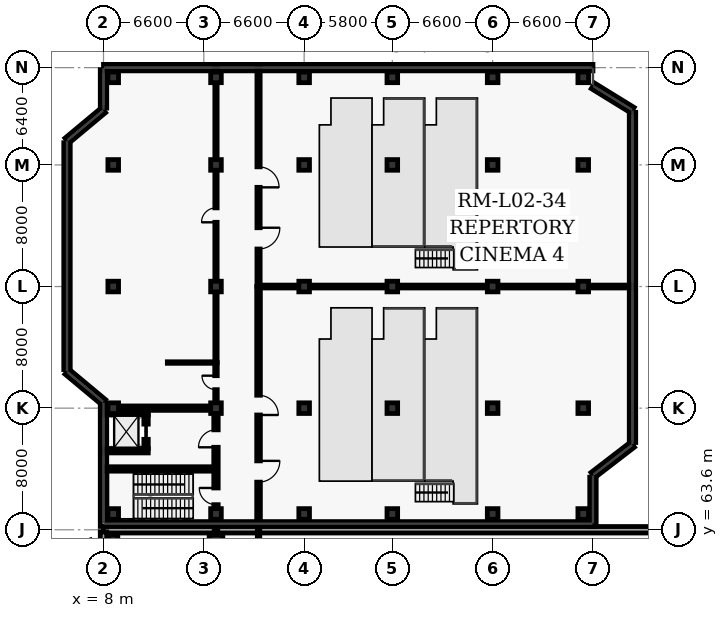
"""IFC4 building model, lengths in metres.
Left out: names, types, materials, properties, quantities, classifications, styles, units other than length and angle.
Written with IfcOpenShell. Run it as: python <this file> out.ifc"""

import sys

from ifc_helpers import new_model, si_unit, direction, frame, frame_2d, origin, origin_2d, place, context, subcontext, project, spatial, rectangle, extrude, element, fill, save


model = new_model("IFC4")
c1 = context("Model", 3, precision=1e-05, world=origin(), true_north=direction((0.0, 1.0)))
c2 = subcontext(c1, "Body", "Model", "MODEL_VIEW")
j1 = project(units=[si_unit("LENGTHUNIT", "METRE"), si_unit("PLANEANGLEUNIT", "RADIAN")], contexts=[c1])
p1 = place(None, origin())
s1 = spatial("IfcSite", under=j1, at=p1, CompositionType="ELEMENT")
p2 = place(p1, origin())
s2 = spatial("IfcBuilding", under=s1, at=p2, CompositionType="ELEMENT")
p3 = place(p2, frame((0.0, 0.0, 10.2)))
s3 = spatial("IfcBuildingStorey", under=s2, at=p3, CompositionType="ELEMENT", Elevation=10.2)
p4 = place(p3, frame((8.64, 62.96, 0.0), z_axis=(0.0, 0.0, 1.0), x_axis=(1.0, 0.0, 0.0)))
e1 = element("IfcColumn", 1, at=p4, inside=s3, PredefinedType="COLUMN", context=c2, shape_type="SweptSolid", body=[
    extrude(rectangle(XDim=0.6, YDim=0.6, at=origin_2d()), origin(), (0.0, 0.0, 1.0), 5.4),
])
p5 = place(p3, frame((15.4, 62.96, 0.0), z_axis=(0.0, 0.0, 1.0), x_axis=(1.0, 0.0, 0.0)))
e2 = element("IfcColumn", 2, at=p5, inside=s3, PredefinedType="COLUMN", context=c2, shape_type="SweptSolid", body=[
    extrude(rectangle(XDim=0.6, YDim=0.9, at=origin_2d()), origin(), (0.0, 0.0, 1.0), 5.4),
])
for number, where, z_axis, x_axis in (
    (3, (8.64, 64.64, 0.0), (0.0, 0.0, 1.0), (1.0, 0.0, 0.0)),
    (4, (8.64, 71.6, 0.0), (0.0, 0.0, 1.0), (1.0, 0.0, 0.0)),
    (5, (8.64, 79.6, 0.0), (0.0, 0.0, 1.0), (1.0, 0.0, 0.0)),
    (6, (8.64, 87.6, 0.0), (0.0, 0.0, 1.0), (1.0, 0.0, 0.0)),
    (7, (8.64, 93.36, 0.0), (0.0, 0.0, 1.0), (1.0, 0.0, 0.0)),
    (8, (15.4, 64.64, 0.0), (0.0, 0.0, 1.0), (1.0, 0.0, 0.0)),
    (9, (15.4, 71.6, 0.0), (0.0, 0.0, 1.0), (1.0, 0.0, 0.0)),
    (10, (15.4, 79.6, 0.0), (0.0, 0.0, 1.0), (1.0, 0.0, 0.0)),
    (11, (15.4, 87.6, 0.0), (0.0, 0.0, 1.0), (1.0, 0.0, 0.0)),
    (12, (15.4, 93.36, 0.0), (0.0, 0.0, 1.0), (1.0, 0.0, 0.0)),
    (13, (21.2, 64.64, 0.0), (0.0, 0.0, 1.0), (1.0, 0.0, 0.0)),
    (14, (21.2, 71.6, 0.0), (0.0, 0.0, 1.0), (1.0, 0.0, 0.0)),
    (15, (21.2, 79.6, 0.0), (0.0, 0.0, 1.0), (1.0, 0.0, 0.0)),
    (16, (21.2, 87.6, 0.0), (0.0, 0.0, 1.0), (1.0, 0.0, 0.0)),
    (17, (21.2, 93.36, 0.0), (0.0, 0.0, 1.0), (1.0, 0.0, 0.0)),
    (18, (27.0, 64.64, 0.0), (0.0, 0.0, 1.0), (1.0, 0.0, 0.0)),
    (19, (27.0, 71.6, 0.0), (0.0, 0.0, 1.0), (1.0, 0.0, 0.0)),
    (20, (27.0, 79.6, 0.0), (0.0, 0.0, 1.0), (1.0, 0.0, 0.0)),
    (21, (27.0, 87.6, 0.0), (0.0, 0.0, 1.0), (1.0, 0.0, 0.0)),
    (22, (27.0, 93.36, 0.0), (0.0, 0.0, 1.0), (1.0, 0.0, 0.0)),
    (23, (33.6, 64.64, 0.0), (0.0, 0.0, 1.0), (1.0, 0.0, 0.0)),
    (24, (33.6, 71.6, 0.0), (0.0, 0.0, 1.0), (1.0, 0.0, 0.0)),
    (25, (33.6, 79.6, 0.0), (0.0, 0.0, 1.0), (1.0, 0.0, 0.0)),
    (26, (33.6, 87.6, 0.0), (0.0, 0.0, 1.0), (1.0, 0.0, 0.0)),
    (27, (33.6, 93.36, 0.0), (0.0, 0.0, 1.0), (1.0, 0.0, 0.0)),
    (28, (39.56, 64.64, 0.0), (0.0, 0.0, 1.0), (1.0, 0.0, 0.0)),
    (29, (39.56, 71.6, 0.0), (0.0, 0.0, 1.0), (1.0, 0.0, 0.0)),
    (30, (39.56, 79.6, 0.0), (0.0, 0.0, 1.0), (1.0, 0.0, 0.0)),
    (31, (39.56, 87.6, 0.0), (0.0, 0.0, 1.0), (1.0, 0.0, 0.0)),
    (32, (39.56, 93.36, 0.0), (0.0, 0.0, 1.0), (1.0, 0.0, 0.0)),
):
    element("IfcColumn", number, at=place(p3, frame(where, z_axis=z_axis, x_axis=x_axis)), inside=s3, PredefinedType="COLUMN", context=c2, shape_type="SweptSolid", body=[
        extrude(rectangle(XDim=0.7, YDim=0.7, at=origin_2d()), origin(), (0.0, 0.0, 1.0), 5.4),
    ])
p6 = place(p3, frame((8.0, 63.6, 0.0), z_axis=(0.0, 0.0, 1.0), x_axis=(1.0, 0.0, 0.0)))
e33 = element("IfcWall", 33, at=p6, inside=s3, PredefinedType="SOLIDWALL", context=c2, shape_type="SweptSolid", body=[
    extrude(rectangle(XDim=38.0, YDim=0.425, at=frame_2d((19.0, 0.0))), origin(), (0.0, 0.0, 1.0), 5.16),
])
p7 = place(p3, frame((8.0, 7.74, 0.0), z_axis=(0.0, 0.0, 1.0), x_axis=(0.0, 1.0, 0.0)))
e34 = element("IfcWall", 34, at=p7, inside=s3, PredefinedType="SOLIDWALL", context=c2, shape_type="SweptSolid", body=[
    extrude(rectangle(XDim=55.72, YDim=0.425, at=frame_2d((27.86, 0.0))), origin(), (0.0, 0.0, 1.0), 5.16),
])
p8 = place(p3, frame((8.0, 72.0, 0.0), z_axis=(0.0, 0.0, 1.0), x_axis=(-0.768208468069, 0.640199773186, 0.0)))
e35 = element("IfcWall", 35, at=p8, inside=s3, PredefinedType="SOLIDWALL", context=c2, shape_type="SweptSolid", body=[
    extrude(rectangle(XDim=3.124, YDim=0.425, at=frame_2d((1.562, 0.0))), origin(), (0.0, 0.0, 1.0), 5.1),
])
p9 = place(p3, frame((5.6, 74.14, 0.0), z_axis=(0.0, 0.0, 1.0), x_axis=(0.0, 1.0, 0.0)))
e36 = element("IfcWall", 36, at=p9, inside=s3, PredefinedType="SOLIDWALL", context=c2, shape_type="SweptSolid", body=[
    extrude(rectangle(XDim=14.92, YDim=0.425, at=frame_2d((7.46, 0.0))), origin(), (0.0, 0.0, 1.0), 5.1),
])
p10 = place(p3, frame((5.6, 89.2, 0.0), z_axis=(0.0, 0.0, 1.0), x_axis=(0.768208468069, 0.640199773186, 0.0)))
e37 = element("IfcWall", 37, at=p10, inside=s3, PredefinedType="SOLIDWALL", context=c2, shape_type="SweptSolid", body=[
    extrude(rectangle(XDim=3.124, YDim=0.425, at=frame_2d((1.562, 0.0))), origin(), (0.0, 0.0, 1.0), 5.1),
])
p11 = place(p3, frame((8.0, 91.34, 0.0), z_axis=(0.0, 0.0, 1.0), x_axis=(0.0, 1.0, 0.0)))
e38 = element("IfcWall", 38, at=p11, inside=s3, PredefinedType="SOLIDWALL", context=c2, shape_type="SweptSolid", body=[
    extrude(rectangle(XDim=2.52, YDim=0.425, at=frame_2d((1.26, 0.0))), origin(), (0.0, 0.0, 1.0), 5.1),
])
p12 = place(p3, frame((8.0, 94.0, 0.0), z_axis=(0.0, 0.0, 1.0), x_axis=(1.0, 0.0, 0.0)))
e39 = element("IfcWall", 39, at=p12, inside=s3, PredefinedType="SOLIDWALL", context=c2, shape_type="SweptSolid", body=[
    extrude(rectangle(XDim=32.2, YDim=0.425, at=frame_2d((16.1, 0.0))), origin(), (0.0, 0.0, 1.0), 3.7),
])
p13 = place(p3, frame((40.2, 92.8, 0.0), z_axis=(0.0, 0.0, 1.0), x_axis=(0.851652825334, -0.524106349037, 0.0)))
e40 = element("IfcWall", 40, at=p13, inside=s3, PredefinedType="SOLIDWALL", context=c2, shape_type="SweptSolid", body=[
    extrude(rectangle(XDim=3.053, YDim=0.425, at=frame_2d((1.526, 0.0))), origin(), (0.0, 0.0, 1.0), 5.1),
])
p14 = place(p3, frame((42.8, 91.06, 0.0), z_axis=(0.0, 0.0, 1.0), x_axis=(0.0, -1.0, 0.0)))
e41 = element("IfcWall", 41, at=p14, inside=s3, PredefinedType="SOLIDWALL", context=c2, shape_type="SweptSolid", body=[
    extrude(rectangle(XDim=21.72, YDim=0.425, at=frame_2d((10.86, 0.0))), origin(), (0.0, 0.0, 1.0), 5.1),
])
p15 = place(p3, frame((42.8, 69.2, 0.0), z_axis=(0.0, 0.0, 1.0), x_axis=(-0.792635056011, -0.609696373601, 0.0)))
e42 = element("IfcWall", 42, at=p15, inside=s3, PredefinedType="SOLIDWALL", context=c2, shape_type="SweptSolid", body=[
    extrude(rectangle(XDim=3.28, YDim=0.425, at=frame_2d((1.64, 0.0))), origin(), (0.0, 0.0, 1.0), 5.1),
])
p16 = place(p3, frame((40.2, 67.06, 0.0), z_axis=(0.0, 0.0, 1.0), x_axis=(0.0, -1.0, 0.0)))
e43 = element("IfcWall", 43, at=p16, inside=s3, PredefinedType="SOLIDWALL", context=c2, shape_type="SweptSolid", body=[
    extrude(rectangle(XDim=3.242, YDim=0.425, at=frame_2d((1.621, 0.0))), origin(), (0.0, 0.0, 1.0), 5.1),
])
p17 = place(p3, frame((40.2, 64.0, 0.0), z_axis=(0.0, 0.0, 1.0), x_axis=(-1.0, 0.0, 0.0)))
e44 = element("IfcWall", 44, at=p17, inside=s3, PredefinedType="SOLIDWALL", context=c2, shape_type="SweptSolid", body=[
    extrude(rectangle(XDim=32.2, YDim=0.275, at=frame_2d((16.1, 0.0))), origin(), (0.0, 0.0, 1.0), 3.7),
])
p18 = place(p3, frame((8.0, 63.818, 0.0), z_axis=(0.0, 0.0, 1.0), x_axis=(0.0, 1.0, 0.0)))
e45 = element("IfcWall", 45, at=p18, inside=s3, PredefinedType="SOLIDWALL", context=c2, shape_type="SweptSolid", body=[
    extrude(rectangle(XDim=8.042, YDim=0.425, at=frame_2d((4.021, 0.0))), origin(), (0.0, 0.0, 1.0), 5.1),
])
p19 = place(p3, frame((7.855, 71.6, 0.0), z_axis=(0.0, 0.0, 1.0), x_axis=(1.0, 0.0, 0.0)))
e46 = element("IfcWall", 46, at=p19, inside=s3, PredefinedType="SHEAR", context=c2, shape_type="SweptSolid", body=[
    extrude(rectangle(XDim=7.193, YDim=0.29, at=frame_2d((3.597, 0.0))), origin(), (0.0, 0.0, 1.0), 5.1),
])
p20 = place(p3, frame((15.4, 64.145, 0.0), z_axis=(0.0, 0.0, 1.0), x_axis=(0.0, 1.0, 0.0)))
e47 = element("IfcWall", 47, at=p20, inside=s3, PredefinedType="SHEAR", context=c2, shape_type="SweptSolid", body=[
    extrude(rectangle(XDim=7.103, YDim=0.29, at=frame_2d((3.552, 0.0))), origin(), (0.0, 0.0, 1.0), 5.1),
])
p21 = place(p20, frame((1.105, 0.0, 0.0)))
e48 = element("IfcOpeningElement", 48, at=p21, cuts=e47, PredefinedType="OPENING", context=c2, shape_type="SweptSolid", body=[
    extrude(rectangle(XDim=1.1, YDim=2.15, at=frame_2d((0.55, 1.075))), frame((0.0, 0.155, 0.0), z_axis=(0.0, -1.0, 0.0), x_axis=(1.0, 0.0, 0.0)), (0.0, 0.0, 1.0), 0.31),
])
p22 = place(p20, frame((4.88, 0.0, 0.0)))
e49 = element("IfcOpeningElement", 49, at=p22, cuts=e47, PredefinedType="OPENING", context=c2, shape_type="SweptSolid", body=[
    extrude(rectangle(XDim=1.15, YDim=2.2, at=frame_2d((0.575, 1.1))), frame((0.0, 0.155, 0.0), z_axis=(0.0, -1.0, 0.0), x_axis=(1.0, 0.0, 0.0)), (0.0, 0.0, 1.0), 0.31),
])
p23 = place(p3, frame((8.145, 67.6, 0.0), z_axis=(0.0, 0.0, 1.0), x_axis=(1.0, 0.0, 0.0)))
e50 = element("IfcWall", 50, at=p23, inside=s3, PredefinedType="SHEAR", context=c2, shape_type="SweptSolid", body=[
    extrude(rectangle(XDim=7.11, YDim=0.29, at=frame_2d((3.555, 0.0))), origin(), (0.0, 0.0, 1.0), 5.1),
])
for number, where, z_axis, x_axis in (
    (51, (8.055, 68.8, 0.0), (0.0, 0.0, 1.0), (1.0, 0.0, 0.0)),
    (52, (8.055, 71.3, 0.0), (0.0, 0.0, 1.0), (1.0, 0.0, 0.0)),
):
    element("IfcWall", number, at=place(p3, frame(where, z_axis=z_axis, x_axis=x_axis)), inside=s3, PredefinedType="SHEAR", context=c2, shape_type="SweptSolid", body=[
        extrude(rectangle(XDim=2.89, YDim=0.29, at=frame_2d((1.445, 0.0))), origin(), (0.0, 0.0, 1.0), 5.1),
    ])
p24 = place(p3, frame((10.8, 68.945, 0.0), z_axis=(0.0, 0.0, 1.0), x_axis=(0.0, 1.0, 0.0)))
e53 = element("IfcWall", 53, at=p24, inside=s3, PredefinedType="SHEAR", context=c2, shape_type="SweptSolid", body=[
    extrude(rectangle(XDim=2.21, YDim=0.29, at=frame_2d((1.105, 0.0))), origin(), (0.0, 0.0, 1.0), 5.1),
])
p25 = place(p24, frame((0.605, 0.0, 0.0)))
e54 = element("IfcOpeningElement", 54, at=p25, cuts=e53, PredefinedType="OPENING", context=c2, shape_type="SweptSolid", body=[
    extrude(rectangle(XDim=1.0, YDim=2.15, at=frame_2d((0.5, 1.075))), frame((0.0, 0.155, 0.0), z_axis=(0.0, -1.0, 0.0), x_axis=(1.0, 0.0, 0.0)), (0.0, 0.0, 1.0), 0.31),
])
p26 = place(p3, frame((15.4, 44.0, 0.0), z_axis=(0.0, 0.0, 1.0), x_axis=(0.0, 1.0, 0.0)))
e55 = element("IfcWall", 55, at=p26, inside=s3, PredefinedType="PARTITIONING", context=c2, shape_type="SweptSolid", body=[
    extrude(rectangle(XDim=19.6, YDim=0.24, at=frame_2d((9.8, 0.0))), origin(), (0.0, 0.0, 1.0), 4.31),
])
p27 = place(p26, frame((9.3, 0.0, 0.0)))
e56 = element("IfcOpeningElement", 56, at=p27, cuts=e55, PredefinedType="OPENING", context=c2, shape_type="SweptSolid", body=[
    extrude(rectangle(XDim=1.0, YDim=2.1, at=frame_2d((0.5, 1.05))), frame((0.0, 0.13, 0.0), z_axis=(0.0, -1.0, 0.0), x_axis=(1.0, 0.0, 0.0)), (0.0, 0.0, 1.0), 0.26),
])
p28 = place(p3, frame((18.2, 63.6, 0.0), z_axis=(0.0, 0.0, 1.0), x_axis=(0.0, -1.0, 0.0)))
e57 = element("IfcWall", 57, at=p28, inside=s3, PredefinedType="PARTITIONING", context=c2, shape_type="SweptSolid", body=[
    extrude(rectangle(XDim=16.0, YDim=0.165, at=frame_2d((8.0, 0.0))), origin(), (0.0, 0.0, 1.0), 5.16),
])
p29 = place(p28, frame((7.41, 0.0, 0.0)))
e58 = element("IfcOpeningElement", 58, at=p29, cuts=e57, PredefinedType="OPENING", context=c2, shape_type="SweptSolid", body=[
    extrude(rectangle(XDim=1.18, YDim=2.15, at=frame_2d((0.59, 1.075))), frame((0.0, 0.093, 0.0), z_axis=(0.0, -1.0, 0.0), x_axis=(1.0, 0.0, 0.0)), (0.0, 0.0, 1.0), 0.185),
])
p30 = place(p28, frame((11.89, 0.0, 0.0)))
e59 = element("IfcOpeningElement", 59, at=p30, cuts=e57, PredefinedType="OPENING", context=c2, shape_type="SweptSolid", body=[
    extrude(rectangle(XDim=1.18, YDim=2.15, at=frame_2d((0.59, 1.075))), frame((0.0, 0.093, 0.0), z_axis=(0.0, -1.0, 0.0), x_axis=(1.0, 0.0, 0.0)), (0.0, 0.0, 1.0), 0.185),
])
p31 = place(p3, frame((15.4, 71.952, 0.0), z_axis=(0.0, 0.0, 1.0), x_axis=(0.0, 1.0, 0.0)))
e60 = element("IfcWall", 60, at=p31, inside=s3, PredefinedType="PARTITIONING", context=c2, shape_type="SweptSolid", body=[
    extrude(rectangle(XDim=2.648, YDim=0.165, at=frame_2d((1.324, 0.0))), origin(), (0.0, 0.0, 1.0), 4.25),
])
p32 = place(p31, frame((0.864, 0.0, 0.0)))
e61 = element("IfcOpeningElement", 61, at=p32, cuts=e60, PredefinedType="OPENING", context=c2, shape_type="SweptSolid", body=[
    extrude(rectangle(XDim=0.92, YDim=2.1, at=frame_2d((0.46, 1.05))), frame((0.0, 0.093, 0.0), z_axis=(0.0, -1.0, 0.0), x_axis=(1.0, 0.0, 0.0)), (0.0, 0.0, 1.0), 0.185),
])
p33 = place(p3, frame((15.4, 74.6, 0.0), z_axis=(0.0, 0.0, 1.0), x_axis=(0.0, 1.0, 0.0)))
e62 = element("IfcWall", 62, at=p33, inside=s3, PredefinedType="PARTITIONING", context=c2, shape_type="SweptSolid", body=[
    extrude(rectangle(XDim=19.4, YDim=0.15, at=frame_2d((9.7, 0.0))), origin(), (0.0, 0.0, 1.0), 4.25),
])
p34 = place(p33, frame((9.225, 0.0, 0.0)))
e63 = element("IfcOpeningElement", 63, at=p34, cuts=e62, PredefinedType="OPENING", context=c2, shape_type="SweptSolid", body=[
    extrude(rectangle(XDim=0.95, YDim=2.1, at=frame_2d((0.475, 1.05))), frame((0.0, 0.085, 0.0), z_axis=(0.0, -1.0, 0.0), x_axis=(1.0, 0.0, 0.0)), (0.0, 0.0, 1.0), 0.17),
])
p35 = place(p3, frame((18.2, 79.6, 0.0), z_axis=(0.0, 0.0, 1.0), x_axis=(0.0, -1.0, 0.0)))
e64 = element("IfcWall", 64, at=p35, inside=s3, PredefinedType="PARTITIONING", context=c2, shape_type="SweptSolid", body=[
    extrude(rectangle(XDim=15.6, YDim=0.24, at=frame_2d((7.8, 0.0))), origin(), (0.0, 0.0, 1.0), 5.1),
])
p36 = place(p35, frame((7.15, 0.0, 0.0)))
e65 = element("IfcOpeningElement", 65, at=p36, cuts=e64, PredefinedType="OPENING", context=c2, shape_type="SweptSolid", body=[
    extrude(rectangle(XDim=1.3, YDim=2.2, at=frame_2d((0.65, 1.1))), frame((0.0, 0.13, 0.0), z_axis=(0.0, -1.0, 0.0), x_axis=(1.0, 0.0, 0.0)), (0.0, 0.0, 1.0), 0.26),
])
p37 = place(p35, frame((11.468, 0.0, 0.0)))
e66 = element("IfcOpeningElement", 66, at=p37, cuts=e64, PredefinedType="OPENING", context=c2, shape_type="SweptSolid", body=[
    extrude(rectangle(XDim=1.4, YDim=2.25, at=frame_2d((0.7, 1.125))), frame((0.0, 0.13, 0.0), z_axis=(0.0, -1.0, 0.0), x_axis=(1.0, 0.0, 0.0)), (0.0, 0.0, 1.0), 0.26),
])
p38 = place(p3, frame((18.2, 94.0, 0.0), z_axis=(0.0, 0.0, 1.0), x_axis=(0.0, -1.0, 0.0)))
e67 = element("IfcWall", 67, at=p38, inside=s3, PredefinedType="PARTITIONING", context=c2, shape_type="SweptSolid", body=[
    extrude(rectangle(XDim=14.4, YDim=0.21, at=frame_2d((7.2, 0.0))), origin(), (0.0, 0.0, 1.0), 5.1),
])
p39 = place(p38, frame((6.525, 0.0, 0.0)))
e68 = element("IfcOpeningElement", 68, at=p39, cuts=e67, PredefinedType="OPENING", context=c2, shape_type="SweptSolid", body=[
    extrude(rectangle(XDim=1.35, YDim=2.2, at=frame_2d((0.675, 1.1))), frame((0.0, 0.115, 0.0), z_axis=(0.0, -1.0, 0.0), x_axis=(1.0, 0.0, 0.0)), (0.0, 0.0, 1.0), 0.23),
])
p40 = place(p38, frame((10.532, 0.0, 0.0)))
e69 = element("IfcOpeningElement", 69, at=p40, cuts=e67, PredefinedType="OPENING", context=c2, shape_type="SweptSolid", body=[
    extrude(rectangle(XDim=1.4, YDim=2.25, at=frame_2d((0.7, 1.125))), frame((0.0, 0.115, 0.0), z_axis=(0.0, -1.0, 0.0), x_axis=(1.0, 0.0, 0.0)), (0.0, 0.0, 1.0), 0.23),
])
p41 = place(p3, frame((12.2, 74.6, 0.0), z_axis=(0.0, 0.0, 1.0), x_axis=(1.0, 0.0, 0.0)))
e70 = element("IfcWall", 70, at=p41, inside=s3, PredefinedType="PARTITIONING", context=c2, shape_type="SweptSolid", body=[
    extrude(rectangle(XDim=3.2, YDim=0.1, at=frame_2d((1.6, 0.0))), origin(), (0.0, 0.0, 1.0), 5.1),
])
p42 = place(p3, frame((18.2, 79.6, 0.0), z_axis=(0.0, 0.0, 1.0), x_axis=(1.0, 0.0, 0.0)))
e71 = element("IfcWall", 71, at=p42, inside=s3, PredefinedType="PARTITIONING", context=c2, shape_type="SweptSolid", body=[
    extrude(rectangle(XDim=24.6, YDim=0.19, at=frame_2d((12.3, 0.0))), origin(), (0.0, 0.0, 1.0), 3.7),
])
p43 = place(p21, origin())
e72 = element("IfcDoor", 72, at=p43, inside=s3, OperationType="SINGLE_SWING_RIGHT", PredefinedType="DOOR", context=c2, shape_type="SweptSolid", body=[
    extrude(rectangle(XDim=1.1, YDim=2.15, at=frame_2d((0.55, 1.075))), frame((0.0, 0.025, 0.0), z_axis=(0.0, -1.0, 0.0), x_axis=(1.0, 0.0, 0.0)), (0.0, 0.0, 1.0), 0.05),
])
fill(e48, e72)
p44 = place(p22, origin())
e73 = element("IfcDoor", 73, at=p44, inside=s3, OperationType="SINGLE_SWING_LEFT", PredefinedType="DOOR", context=c2, shape_type="SweptSolid", body=[
    extrude(rectangle(XDim=1.15, YDim=2.2, at=frame_2d((0.575, 1.1))), frame((0.0, 0.025, 0.0), z_axis=(0.0, -1.0, 0.0), x_axis=(1.0, 0.0, 0.0)), (0.0, 0.0, 1.0), 0.05),
])
fill(e49, e73)
p45 = place(p25, origin())
e74 = element("IfcDoor", 74, at=p45, inside=s3, OperationType="SLIDING_TO_LEFT", PredefinedType="DOOR", context=c2, shape_type="SweptSolid", body=[
    extrude(rectangle(XDim=1.0, YDim=2.15, at=frame_2d((0.5, 1.075))), frame((0.0, 0.025, 0.0), z_axis=(0.0, -1.0, 0.0), x_axis=(1.0, 0.0, 0.0)), (0.0, 0.0, 1.0), 0.05),
])
fill(e54, e74)
p46 = place(p32, origin())
e75 = element("IfcDoor", 75, at=p46, inside=s3, OperationType="SINGLE_SWING_RIGHT", PredefinedType="DOOR", context=c2, shape_type="SweptSolid", body=[
    extrude(rectangle(XDim=0.92, YDim=2.1, at=frame_2d((0.46, 1.05))), frame((0.0, 0.025, 0.0), z_axis=(0.0, -1.0, 0.0), x_axis=(1.0, 0.0, 0.0)), (0.0, 0.0, 1.0), 0.05),
])
fill(e61, e75)
p47 = place(p34, origin())
e76 = element("IfcDoor", 76, at=p47, inside=s3, OperationType="SINGLE_SWING_LEFT", PredefinedType="DOOR", context=c2, shape_type="SweptSolid", body=[
    extrude(rectangle(XDim=0.95, YDim=2.1, at=frame_2d((0.475, 1.05))), frame((0.0, 0.025, 0.0), z_axis=(0.0, -1.0, 0.0), x_axis=(1.0, 0.0, 0.0)), (0.0, 0.0, 1.0), 0.05),
])
fill(e63, e76)
p48 = place(p36, origin())
e77 = element("IfcDoor", 77, at=p48, inside=s3, OperationType="SINGLE_SWING_RIGHT", PredefinedType="DOOR", context=c2, shape_type="SweptSolid", body=[
    extrude(rectangle(XDim=1.3, YDim=2.2, at=frame_2d((0.65, 1.1))), frame((0.0, 0.025, 0.0), z_axis=(0.0, -1.0, 0.0), x_axis=(1.0, 0.0, 0.0)), (0.0, 0.0, 1.0), 0.05),
])
fill(e65, e77)
p49 = place(p37, origin())
e78 = element("IfcDoor", 78, at=p49, inside=s3, OperationType="SINGLE_SWING_LEFT", PredefinedType="DOOR", context=c2, shape_type="SweptSolid", body=[
    extrude(rectangle(XDim=1.4, YDim=2.25, at=frame_2d((0.7, 1.125))), frame((0.0, 0.025, 0.0), z_axis=(0.0, -1.0, 0.0), x_axis=(1.0, 0.0, 0.0)), (0.0, 0.0, 1.0), 0.05),
])
fill(e66, e78)
p50 = place(p39, origin())
e79 = element("IfcDoor", 79, at=p50, inside=s3, OperationType="SINGLE_SWING_RIGHT", PredefinedType="DOOR", context=c2, shape_type="SweptSolid", body=[
    extrude(rectangle(XDim=1.35, YDim=2.2, at=frame_2d((0.675, 1.1))), frame((0.0, 0.025, 0.0), z_axis=(0.0, -1.0, 0.0), x_axis=(1.0, 0.0, 0.0)), (0.0, 0.0, 1.0), 0.05),
])
fill(e68, e79)
p51 = place(p40, origin())
e80 = element("IfcDoor", 80, at=p51, inside=s3, OperationType="SINGLE_SWING_LEFT", PredefinedType="DOOR", context=c2, shape_type="SweptSolid", body=[
    extrude(rectangle(XDim=1.4, YDim=2.25, at=frame_2d((0.7, 1.125))), frame((0.0, 0.025, 0.0), z_axis=(0.0, -1.0, 0.0), x_axis=(1.0, 0.0, 0.0)), (0.0, 0.0, 1.0), 0.05),
])
fill(e69, e80)
save(model, sys.argv[1])
